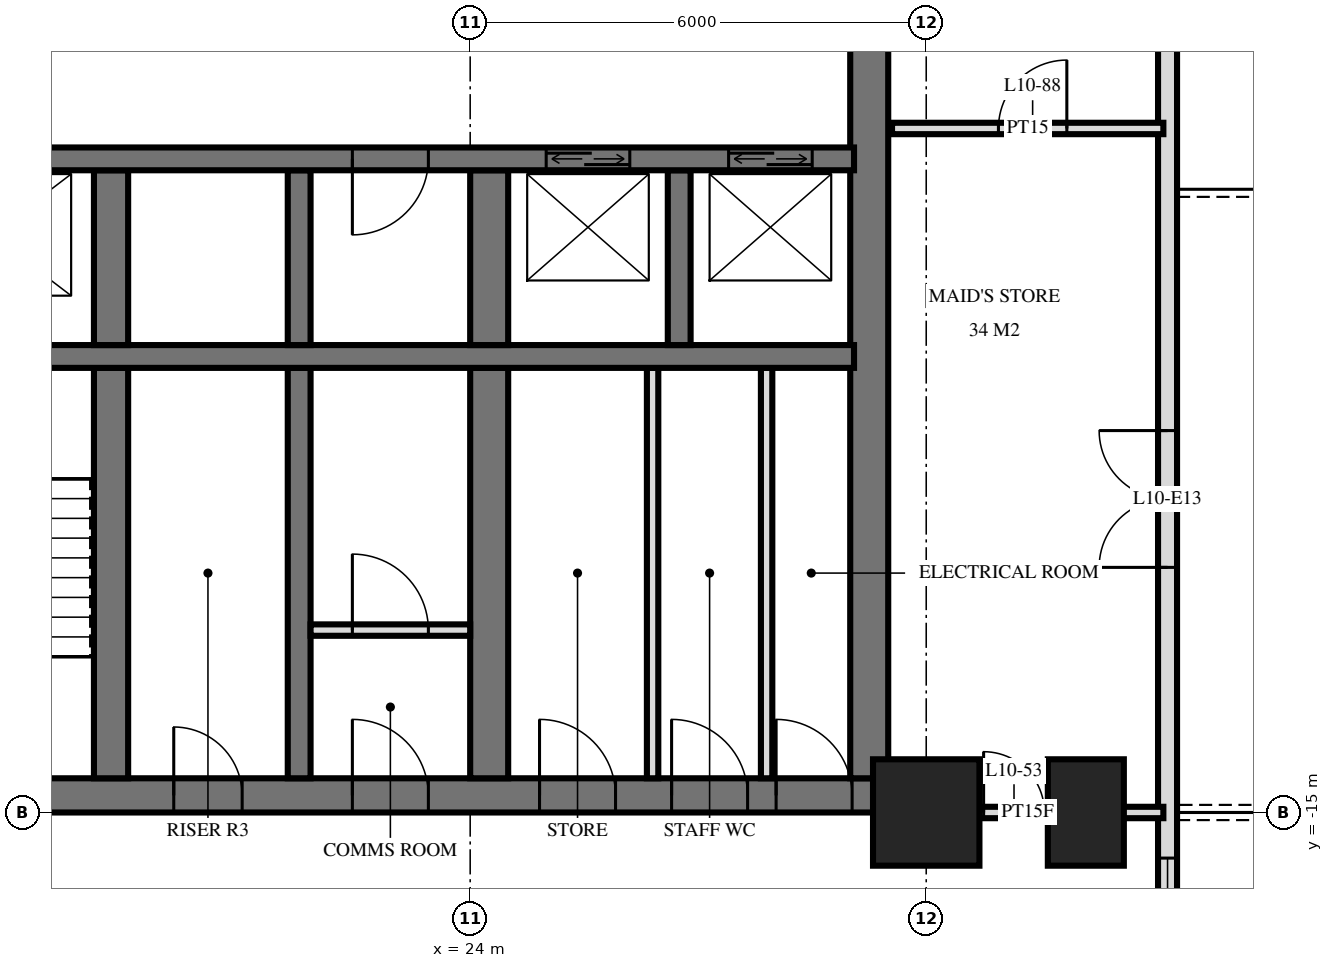
"""IFC4 building model, lengths in metres.
Left out: names, types, materials, properties, quantities, classifications, styles, units other than length and angle.
Written with IfcOpenShell. Run it as: python <this file> out.ifc"""

import sys

from ifc_helpers import new_model, si_unit, direction, frame, frame_2d, origin, origin_2d, place, context, subcontext, project, spatial, rectangle, extrude, element, fill, save


model = new_model("IFC4")
c1 = context("Model", 3, precision=1e-05, world=origin(), true_north=direction((0.0, 1.0)))
c2 = subcontext(c1, "Body", "Model", "MODEL_VIEW")
j1 = project(units=[si_unit("LENGTHUNIT", "METRE"), si_unit("PLANEANGLEUNIT", "RADIAN")], contexts=[c1])
p1 = place(None, origin())
s1 = spatial("IfcSite", under=j1, at=p1, CompositionType="ELEMENT")
p2 = place(p1, origin())
s2 = spatial("IfcBuilding", under=s1, at=p2, CompositionType="ELEMENT")
p3 = place(p2, frame((0.0, 0.0, 45.6)))
s3 = spatial("IfcBuildingStorey", under=s2, at=p3, CompositionType="ELEMENT", Elevation=45.6)
p4 = place(p3, frame((30.0, -15.0, 0.0), z_axis=(0.0, 0.0, 1.0), x_axis=(1.0, 0.0, 0.0)))
e1 = element("IfcColumn", 1, at=p4, inside=s3, PredefinedType="COLUMN", context=c2, shape_type="SweptSolid", body=[
    extrude(rectangle(XDim=1.4, YDim=1.4, at=origin_2d()), origin(), (0.0, 0.0, 1.0), 3.6),
])
p5 = place(p3, frame((32.1, -15.0, 0.0), z_axis=(0.0, 0.0, 1.0), x_axis=(0.0, 1.0, 0.0)))
e2 = element("IfcColumn", 2, at=p5, inside=s3, PredefinedType="COLUMN", context=c2, shape_type="SweptSolid", body=[
    extrude(rectangle(XDim=1.4, YDim=1.0, at=origin_2d()), origin(), (0.0, 0.0, 1.0), 3.6),
])
p6 = place(p3, frame((10.0, -14.775, 0.0), z_axis=(0.0, 0.0, 1.0), x_axis=(1.0, 0.0, 0.0)))
e3 = element("IfcWall", 3, at=p6, inside=s3, PredefinedType="SHEAR", context=c2, shape_type="SweptSolid", body=[
    extrude(rectangle(XDim=19.5, YDim=0.45, at=frame_2d((9.75, 0.0))), origin(), (0.0, 0.0, 1.0), 3.6),
])
p7 = place(p6, frame((7.1, 0.0, 0.0)))
e4 = element("IfcOpeningElement", 4, at=p7, cuts=e3, PredefinedType="OPENING", context=c2, shape_type="SweptSolid", body=[
    extrude(rectangle(XDim=1.2, YDim=2.1, at=frame_2d((0.6, 1.05))), frame((0.0, 0.235, 0.0), z_axis=(0.0, -1.0, 0.0), x_axis=(1.0, 0.0, 0.0)), (0.0, 0.0, 1.0), 0.47),
])
p8 = place(p6, frame((4.15, 0.0, 0.0)))
e5 = element("IfcOpeningElement", 5, at=p8, cuts=e3, PredefinedType="OPENING", context=c2, shape_type="SweptSolid", body=[
    extrude(rectangle(XDim=1.1, YDim=2.1, at=frame_2d((0.55, 1.05))), frame((0.0, 0.235, 0.0), z_axis=(0.0, -1.0, 0.0), x_axis=(1.0, 0.0, 0.0)), (0.0, 0.0, 1.0), 0.47),
])
p9 = place(p6, frame((10.1, 0.0, 0.0)))
e6 = element("IfcOpeningElement", 6, at=p9, cuts=e3, PredefinedType="OPENING", context=c2, shape_type="SweptSolid", body=[
    extrude(rectangle(XDim=0.9, YDim=2.1, at=frame_2d((0.45, 1.05))), frame((0.0, 0.235, 0.0), z_axis=(0.0, -1.0, 0.0), x_axis=(1.0, 0.0, 0.0)), (0.0, 0.0, 1.0), 0.47),
])
p10 = place(p6, frame((12.45, 0.0, 0.0)))
e7 = element("IfcOpeningElement", 7, at=p10, cuts=e3, PredefinedType="OPENING", context=c2, shape_type="SweptSolid", body=[
    extrude(rectangle(XDim=1.0, YDim=2.1, at=frame_2d((0.5, 1.05))), frame((0.0, 0.235, 0.0), z_axis=(0.0, -1.0, 0.0), x_axis=(1.0, 0.0, 0.0)), (0.0, 0.0, 1.0), 0.47),
])
p11 = place(p6, frame((14.913, 0.0, 0.0)))
e8 = element("IfcOpeningElement", 8, at=p11, cuts=e3, PredefinedType="OPENING", context=c2, shape_type="SweptSolid", body=[
    extrude(rectangle(XDim=1.0, YDim=2.1, at=frame_2d((0.5, 1.05))), frame((0.0, 0.235, 0.0), z_axis=(0.0, -1.0, 0.0), x_axis=(1.0, 0.0, 0.0)), (0.0, 0.0, 1.0), 0.47),
])
p12 = place(p6, frame((16.65, 0.0, 0.0)))
e9 = element("IfcOpeningElement", 9, at=p12, cuts=e3, PredefinedType="OPENING", context=c2, shape_type="SweptSolid", body=[
    extrude(rectangle(XDim=1.0, YDim=2.1, at=frame_2d((0.5, 1.05))), frame((0.0, 0.235, 0.0), z_axis=(0.0, -1.0, 0.0), x_axis=(1.0, 0.0, 0.0)), (0.0, 0.0, 1.0), 0.47),
])
p13 = place(p6, frame((18.025, 0.0, 0.0)))
e10 = element("IfcOpeningElement", 10, at=p13, cuts=e3, PredefinedType="OPENING", context=c2, shape_type="SweptSolid", body=[
    extrude(rectangle(XDim=1.0, YDim=2.1, at=frame_2d((0.5, 1.05))), frame((0.0, 0.235, 0.0), z_axis=(0.0, -1.0, 0.0), x_axis=(1.0, 0.0, 0.0)), (0.0, 0.0, 1.0), 0.47),
])
p14 = place(p3, frame((29.25, -14.55, 0.0), z_axis=(0.0, 0.0, 1.0), x_axis=(0.0, 1.0, 0.0)))
e11 = element("IfcWall", 11, at=p14, inside=s3, PredefinedType="SHEAR", context=c2, shape_type="SweptSolid", body=[
    extrude(rectangle(XDim=14.1, YDim=0.5, at=frame_2d((7.05, 0.0))), origin(), (0.0, 0.0, 1.0), 3.6),
])
p15 = place(p3, frame((10.35, -6.4, 0.0), z_axis=(0.0, 0.0, 1.0), x_axis=(1.0, 0.0, 0.0)))
e12 = element("IfcWall", 12, at=p15, inside=s3, PredefinedType="SHEAR", context=c2, shape_type="SweptSolid", body=[
    extrude(rectangle(XDim=18.7, YDim=0.3, at=frame_2d((9.35, 0.0))), origin(), (0.0, 0.0, 1.0), 3.6),
])
p16 = place(p15, frame((14.65, 0.0, 0.0)))
e13 = element("IfcOpeningElement", 13, at=p16, cuts=e12, PredefinedType="OPENING", context=c2, shape_type="SweptSolid", body=[
    extrude(rectangle(XDim=1.1, YDim=2.1, at=frame_2d((0.55, 1.05))), frame((0.0, 0.16, 0.0), z_axis=(0.0, -1.0, 0.0), x_axis=(1.0, 0.0, 0.0)), (0.0, 0.0, 1.0), 0.32),
])
p17 = place(p15, frame((17.05, 0.0, 0.0)))
e14 = element("IfcOpeningElement", 14, at=p17, cuts=e12, PredefinedType="OPENING", context=c2, shape_type="SweptSolid", body=[
    extrude(rectangle(XDim=1.1, YDim=2.1, at=frame_2d((0.55, 1.05))), frame((0.0, 0.16, 0.0), z_axis=(0.0, -1.0, 0.0), x_axis=(1.0, 0.0, 0.0)), (0.0, 0.0, 1.0), 0.32),
])
p18 = place(p15, frame((6.8, 0.0, 0.0)))
e15 = element("IfcOpeningElement", 15, at=p18, cuts=e12, PredefinedType="OPENING", context=c2, shape_type="SweptSolid", body=[
    extrude(rectangle(XDim=1.1, YDim=2.1, at=frame_2d((0.55, 1.05))), frame((0.0, 0.16, 0.0), z_axis=(0.0, -1.0, 0.0), x_axis=(1.0, 0.0, 0.0)), (0.0, 0.0, 1.0), 0.32),
])
p19 = place(p15, frame((12.1, 0.0, 0.0)))
e16 = element("IfcOpeningElement", 16, at=p19, cuts=e12, PredefinedType="OPENING", context=c2, shape_type="SweptSolid", body=[
    extrude(rectangle(XDim=1.0, YDim=2.1, at=frame_2d((0.5, 1.05))), frame((0.0, 0.16, 0.0), z_axis=(0.0, -1.0, 0.0), x_axis=(1.0, 0.0, 0.0)), (0.0, 0.0, 1.0), 0.32),
])
p20 = place(p3, frame((10.35, -9.0, 0.0), z_axis=(0.0, 0.0, 1.0), x_axis=(1.0, 0.0, 0.0)))
e17 = element("IfcWall", 17, at=p20, inside=s3, PredefinedType="SHEAR", context=c2, shape_type="SweptSolid", body=[
    extrude(rectangle(XDim=18.7, YDim=0.3, at=frame_2d((9.35, 0.0))), origin(), (0.0, 0.0, 1.0), 3.6),
])
p21 = place(p20, frame((3.8, 0.0, 0.0)))
e18 = element("IfcOpeningElement", 18, at=p21, cuts=e17, PredefinedType="OPENING", context=c2, shape_type="SweptSolid", body=[
    extrude(rectangle(XDim=1.1, YDim=2.1, at=frame_2d((0.55, 1.05))), frame((0.0, 0.16, 0.0), z_axis=(0.0, -1.0, 0.0), x_axis=(1.0, 0.0, 0.0)), (0.0, 0.0, 1.0), 0.32),
])
p22 = place(p3, frame((19.275, -8.85, 0.0), z_axis=(0.0, 0.0, 1.0), x_axis=(0.0, 1.0, 0.0)))
e19 = element("IfcWall", 19, at=p22, inside=s3, PredefinedType="SHEAR", context=c2, shape_type="SweptSolid", body=[
    extrude(rectangle(XDim=2.3, YDim=0.45, at=frame_2d((1.15, 0.0))), origin(), (0.0, 0.0, 1.0), 3.6),
])
p23 = place(p3, frame((19.275, -14.55, 0.0), z_axis=(0.0, 0.0, 1.0), x_axis=(0.0, 1.0, 0.0)))
e20 = element("IfcWall", 20, at=p23, inside=s3, PredefinedType="SHEAR", context=c2, shape_type="SweptSolid", body=[
    extrude(rectangle(XDim=5.4, YDim=0.45, at=frame_2d((2.7, 0.0))), origin(), (0.0, 0.0, 1.0), 3.6),
])
p24 = place(p3, frame((21.75, -8.85, 0.0), z_axis=(0.0, 0.0, 1.0), x_axis=(0.0, 1.0, 0.0)))
e21 = element("IfcWall", 21, at=p24, inside=s3, PredefinedType="SHEAR", context=c2, shape_type="SweptSolid", body=[
    extrude(rectangle(XDim=2.3, YDim=0.3, at=frame_2d((1.15, 0.0))), origin(), (0.0, 0.0, 1.0), 3.6),
])
p25 = place(p3, frame((21.75, -14.55, 0.0), z_axis=(0.0, 0.0, 1.0), x_axis=(0.0, 1.0, 0.0)))
e22 = element("IfcWall", 22, at=p25, inside=s3, PredefinedType="SHEAR", context=c2, shape_type="SweptSolid", body=[
    extrude(rectangle(XDim=5.4, YDim=0.3, at=frame_2d((2.7, 0.0))), origin(), (0.0, 0.0, 1.0), 3.6),
])
p26 = place(p3, frame((24.25, -8.85, 0.0), z_axis=(0.0, 0.0, 1.0), x_axis=(0.0, 1.0, 0.0)))
e23 = element("IfcWall", 23, at=p26, inside=s3, PredefinedType="SHEAR", context=c2, shape_type="SweptSolid", body=[
    extrude(rectangle(XDim=2.3, YDim=0.5, at=frame_2d((1.15, 0.0))), origin(), (0.0, 0.0, 1.0), 3.6),
])
p27 = place(p3, frame((24.25, -14.55, 0.0), z_axis=(0.0, 0.0, 1.0), x_axis=(0.0, 1.0, 0.0)))
e24 = element("IfcWall", 24, at=p27, inside=s3, PredefinedType="SHEAR", context=c2, shape_type="SweptSolid", body=[
    extrude(rectangle(XDim=5.4, YDim=0.5, at=frame_2d((2.7, 0.0))), origin(), (0.0, 0.0, 1.0), 3.6),
])
p28 = place(p3, frame((26.75, -8.85, 0.0), z_axis=(0.0, 0.0, 1.0), x_axis=(0.0, 1.0, 0.0)))
e25 = element("IfcWall", 25, at=p28, inside=s3, PredefinedType="SHEAR", context=c2, shape_type="SweptSolid", body=[
    extrude(rectangle(XDim=2.3, YDim=0.3, at=frame_2d((1.15, 0.0))), origin(), (0.0, 0.0, 1.0), 3.6),
])
p29 = place(p3, frame((33.175, -24.875, 0.0), z_axis=(0.0, 0.0, 1.0), x_axis=(0.0, 1.0, 0.0)))
e26 = element("IfcWall", 26, at=p29, inside=s3, PredefinedType="SOLIDWALL", context=c2, shape_type="SweptSolid", body=[
    extrude(rectangle(XDim=21.551, YDim=0.25, at=frame_2d((10.775, 0.0))), origin(), (0.0, 0.0, 1.0), 3.32),
])
p30 = place(p29, frame((0.575, 0.0, 0.0)))
e27 = element("IfcOpeningElement", 27, at=p30, cuts=e26, PredefinedType="OPENING", context=c2, shape_type="SweptSolid", body=[
    extrude(rectangle(XDim=1.8, YDim=2.4, at=frame_2d((0.9, 1.2))), frame((0.0, 0.135, 0.0), z_axis=(0.0, -1.0, 0.0), x_axis=(1.0, 0.0, 0.0)), (0.0, 0.0, 1.0), 0.27),
])
p31 = place(p29, frame((5.075, 0.0, 0.0)))
e28 = element("IfcOpeningElement", 28, at=p31, cuts=e26, PredefinedType="OPENING", context=c2, shape_type="SweptSolid", body=[
    extrude(rectangle(XDim=1.8, YDim=2.4, at=frame_2d((0.9, 1.2))), frame((0.0, 0.135, 0.0), z_axis=(0.0, -1.0, 0.0), x_axis=(1.0, 0.0, 0.0)), (0.0, 0.0, 1.0), 0.27),
])
p32 = place(p29, frame((8.075, 0.0, 0.3)))
e29 = element("IfcOpeningElement", 29, at=p32, cuts=e26, PredefinedType="OPENING", context=c2, shape_type="SweptSolid", body=[
    extrude(rectangle(XDim=1.2, YDim=2.1, at=frame_2d((0.6, 1.05))), frame((0.0, 0.135, 0.0), z_axis=(0.0, -1.0, 0.0), x_axis=(1.0, 0.0, 0.0)), (0.0, 0.0, 1.0), 0.27),
])
p33 = place(p29, frame((13.1, 0.0, 0.0)))
e30 = element("IfcOpeningElement", 30, at=p33, cuts=e26, PredefinedType="OPENING", context=c2, shape_type="SweptSolid", body=[
    extrude(rectangle(XDim=1.8, YDim=2.4, at=frame_2d((0.9, 1.2))), frame((0.0, 0.135, 0.0), z_axis=(0.0, -1.0, 0.0), x_axis=(1.0, 0.0, 0.0)), (0.0, 0.0, 1.0), 0.27),
])
p34 = place(p3, frame((21.9, -12.6, 0.0), z_axis=(0.0, 0.0, 1.0), x_axis=(1.0, 0.0, 0.0)))
e31 = element("IfcWall", 31, at=p34, inside=s3, PredefinedType="PARTITIONING", context=c2, shape_type="SweptSolid", body=[
    extrude(rectangle(XDim=2.1, YDim=0.15, at=frame_2d((1.05, 0.0))), origin(), (0.0, 0.0, 1.0), 3.3),
])
p35 = place(p34, frame((0.55, 0.0, 0.0)))
e32 = element("IfcOpeningElement", 32, at=p35, cuts=e31, PredefinedType="OPENING", context=c2, shape_type="SweptSolid", body=[
    extrude(rectangle(XDim=1.0, YDim=2.1, at=frame_2d((0.5, 1.05))), frame((0.0, 0.085, 0.0), z_axis=(0.0, -1.0, 0.0), x_axis=(1.0, 0.0, 0.0)), (0.0, 0.0, 1.0), 0.17),
])
for number, where, z_axis, x_axis in (
    (33, (26.4, -14.55, 0.0), (0.0, 0.0, 1.0), (0.0, 1.0, 0.0)),
    (34, (27.9, -14.55, 0.0), (0.0, 0.0, 1.0), (0.0, 1.0, 0.0)),
):
    element("IfcWall", number, at=place(p3, frame(where, z_axis=z_axis, x_axis=x_axis)), inside=s3, PredefinedType="PARTITIONING", context=c2, shape_type="SweptSolid", body=[
        extrude(rectangle(XDim=5.4, YDim=0.15, at=frame_2d((2.7, 0.0))), origin(), (0.0, 0.0, 1.0), 3.3),
    ])
p36 = place(p3, frame((29.55, -15.0, 0.0), z_axis=(0.0, 0.0, 1.0), x_axis=(1.0, 0.0, 0.0)))
e35 = element("IfcWall", 35, at=p36, inside=s3, PredefinedType="PARTITIONING", context=c2, shape_type="SweptSolid", body=[
    extrude(rectangle(XDim=3.57, YDim=0.15, at=frame_2d((1.785, 0.0))), origin(), (0.0, 0.0, 1.0), 3.32),
])
p37 = place(p36, frame((1.205, 0.0, 0.0)))
e36 = element("IfcOpeningElement", 36, at=p37, cuts=e35, PredefinedType="OPENING", context=c2, shape_type="SweptSolid", body=[
    extrude(rectangle(XDim=0.8, YDim=2.1, at=frame_2d((0.4, 1.05))), frame((0.0, 0.085, 0.0), z_axis=(0.0, -1.0, 0.0), x_axis=(1.0, 0.0, 0.0)), (0.0, 0.0, 1.0), 0.17),
])
p38 = place(p3, frame((29.55, -6.0, 0.0), z_axis=(0.0, 0.0, 1.0), x_axis=(1.0, 0.0, 0.0)))
e37 = element("IfcWall", 37, at=p38, inside=s3, PredefinedType="PARTITIONING", context=c2, shape_type="SweptSolid", body=[
    extrude(rectangle(XDim=3.57, YDim=0.15, at=frame_2d((1.785, 0.0))), origin(), (0.0, 0.0, 1.0), 3.32),
])
p39 = place(p38, frame((1.4, 0.0, 0.0)))
e38 = element("IfcOpeningElement", 38, at=p39, cuts=e37, PredefinedType="OPENING", context=c2, shape_type="SweptSolid", body=[
    extrude(rectangle(XDim=0.9, YDim=2.1, at=frame_2d((0.45, 1.05))), frame((0.0, 0.085, 0.0), z_axis=(0.0, -1.0, 0.0), x_axis=(1.0, 0.0, 0.0)), (0.0, 0.0, 1.0), 0.17),
])
p40 = place(p32, origin())
e39 = element("IfcWindow", 39, at=p40, inside=s3, PartitioningType="SINGLE_PANEL", PredefinedType="WINDOW", context=c2, shape_type="SweptSolid", body=[
    extrude(rectangle(XDim=1.2, YDim=2.1, at=frame_2d((0.6, 1.05))), frame((0.0, 0.03, 0.0), z_axis=(0.0, -1.0, 0.0), x_axis=(1.0, 0.0, 0.0)), (0.0, 0.0, 1.0), 0.06),
])
fill(e29, e39)
p41 = place(p33, origin())
e40 = element("IfcDoor", 40, at=p41, inside=s3, OperationType="DOUBLE_DOOR_SINGLE_SWING", PredefinedType="DOOR", context=c2, shape_type="SweptSolid", body=[
    extrude(rectangle(XDim=1.8, YDim=2.4, at=frame_2d((0.9, 1.2))), frame((0.0, 0.025, 0.0), z_axis=(0.0, -1.0, 0.0), x_axis=(1.0, 0.0, 0.0)), (0.0, 0.0, 1.0), 0.05),
])
fill(e30, e40)
p42 = place(p16, origin())
e41 = element("IfcDoor", 41, at=p42, inside=s3, OperationType="DOUBLE_DOOR_SLIDING", PredefinedType="USERDEFINED", context=c2, shape_type="SweptSolid", body=[
    extrude(rectangle(XDim=1.1, YDim=2.1, at=frame_2d((0.55, 1.05))), frame((0.0, 0.025, 0.0), z_axis=(0.0, -1.0, 0.0), x_axis=(1.0, 0.0, 0.0)), (0.0, 0.0, 1.0), 0.05),
])
fill(e13, e41)
p43 = place(p17, origin())
e42 = element("IfcDoor", 42, at=p43, inside=s3, OperationType="DOUBLE_DOOR_SLIDING", PredefinedType="USERDEFINED", context=c2, shape_type="SweptSolid", body=[
    extrude(rectangle(XDim=1.1, YDim=2.1, at=frame_2d((0.55, 1.05))), frame((0.0, 0.025, 0.0), z_axis=(0.0, -1.0, 0.0), x_axis=(1.0, 0.0, 0.0)), (0.0, 0.0, 1.0), 0.05),
])
fill(e14, e42)
p44 = place(p9, origin())
e43 = element("IfcDoor", 43, at=p44, inside=s3, OperationType="SINGLE_SWING_RIGHT", PredefinedType="DOOR", context=c2, shape_type="SweptSolid", body=[
    extrude(rectangle(XDim=0.9, YDim=2.1, at=frame_2d((0.45, 1.05))), frame((0.0, 0.025, 0.0), z_axis=(0.0, -1.0, 0.0), x_axis=(1.0, 0.0, 0.0)), (0.0, 0.0, 1.0), 0.05),
])
fill(e6, e43)
p45 = place(p10, origin())
e44 = element("IfcDoor", 44, at=p45, inside=s3, OperationType="SINGLE_SWING_RIGHT", PredefinedType="DOOR", context=c2, shape_type="SweptSolid", body=[
    extrude(rectangle(XDim=1.0, YDim=2.1, at=frame_2d((0.5, 1.05))), frame((0.0, 0.025, 0.0), z_axis=(0.0, -1.0, 0.0), x_axis=(1.0, 0.0, 0.0)), (0.0, 0.0, 1.0), 0.05),
])
fill(e7, e44)
p46 = place(p11, origin())
e45 = element("IfcDoor", 45, at=p46, inside=s3, OperationType="SINGLE_SWING_RIGHT", PredefinedType="DOOR", context=c2, shape_type="SweptSolid", body=[
    extrude(rectangle(XDim=1.0, YDim=2.1, at=frame_2d((0.5, 1.05))), frame((0.0, 0.025, 0.0), z_axis=(0.0, -1.0, 0.0), x_axis=(1.0, 0.0, 0.0)), (0.0, 0.0, 1.0), 0.05),
])
fill(e8, e45)
p47 = place(p12, origin())
e46 = element("IfcDoor", 46, at=p47, inside=s3, OperationType="SINGLE_SWING_RIGHT", PredefinedType="DOOR", context=c2, shape_type="SweptSolid", body=[
    extrude(rectangle(XDim=1.0, YDim=2.1, at=frame_2d((0.5, 1.05))), frame((0.0, 0.025, 0.0), z_axis=(0.0, -1.0, 0.0), x_axis=(1.0, 0.0, 0.0)), (0.0, 0.0, 1.0), 0.05),
])
fill(e9, e46)
p48 = place(p13, origin())
e47 = element("IfcDoor", 47, at=p48, inside=s3, OperationType="SINGLE_SWING_RIGHT", PredefinedType="DOOR", context=c2, shape_type="SweptSolid", body=[
    extrude(rectangle(XDim=1.0, YDim=2.1, at=frame_2d((0.5, 1.05))), frame((0.0, 0.025, 0.0), z_axis=(0.0, -1.0, 0.0), x_axis=(1.0, 0.0, 0.0)), (0.0, 0.0, 1.0), 0.05),
])
fill(e10, e47)
p49 = place(p19, frame((0.5, 0.0, 0.0), z_axis=(0.0, 0.0, 1.0), x_axis=(-1.0, 0.0, 0.0)))
e48 = element("IfcDoor", 48, at=p49, inside=s3, OperationType="SINGLE_SWING_LEFT", PredefinedType="DOOR", context=c2, shape_type="SweptSolid", body=[
    extrude(rectangle(XDim=1.0, YDim=2.1, at=frame_2d((0.0, 1.05))), frame((0.0, -0.025, 0.0), z_axis=(0.0, 1.0, 0.0), x_axis=(-1.0, 0.0, 0.0)), (0.0, 0.0, 1.0), 0.05),
])
fill(e16, e48)
p50 = place(p35, origin())
e49 = element("IfcDoor", 49, at=p50, inside=s3, OperationType="SINGLE_SWING_RIGHT", PredefinedType="DOOR", context=c2, shape_type="SweptSolid", body=[
    extrude(rectangle(XDim=1.0, YDim=2.1, at=frame_2d((0.5, 1.05))), frame((0.0, 0.025, 0.0), z_axis=(0.0, -1.0, 0.0), x_axis=(1.0, 0.0, 0.0)), (0.0, 0.0, 1.0), 0.05),
])
fill(e32, e49)
p51 = place(p37, origin())
e50 = element("IfcDoor", 50, at=p51, inside=s3, OperationType="SINGLE_SWING_RIGHT", PredefinedType="DOOR", context=c2, shape_type="SweptSolid", body=[
    extrude(rectangle(XDim=0.8, YDim=2.1, at=frame_2d((0.4, 1.05))), frame((0.0, 0.025, 0.0), z_axis=(0.0, -1.0, 0.0), x_axis=(1.0, 0.0, 0.0)), (0.0, 0.0, 1.0), 0.05),
])
fill(e36, e50)
p52 = place(p39, origin())
e51 = element("IfcDoor", 51, at=p52, inside=s3, OperationType="SINGLE_SWING_LEFT", PredefinedType="DOOR", context=c2, shape_type="SweptSolid", body=[
    extrude(rectangle(XDim=0.9, YDim=2.1, at=frame_2d((0.45, 1.05))), frame((0.0, 0.025, 0.0), z_axis=(0.0, -1.0, 0.0), x_axis=(1.0, 0.0, 0.0)), (0.0, 0.0, 1.0), 0.05),
])
fill(e38, e51)
save(model, sys.argv[1])
